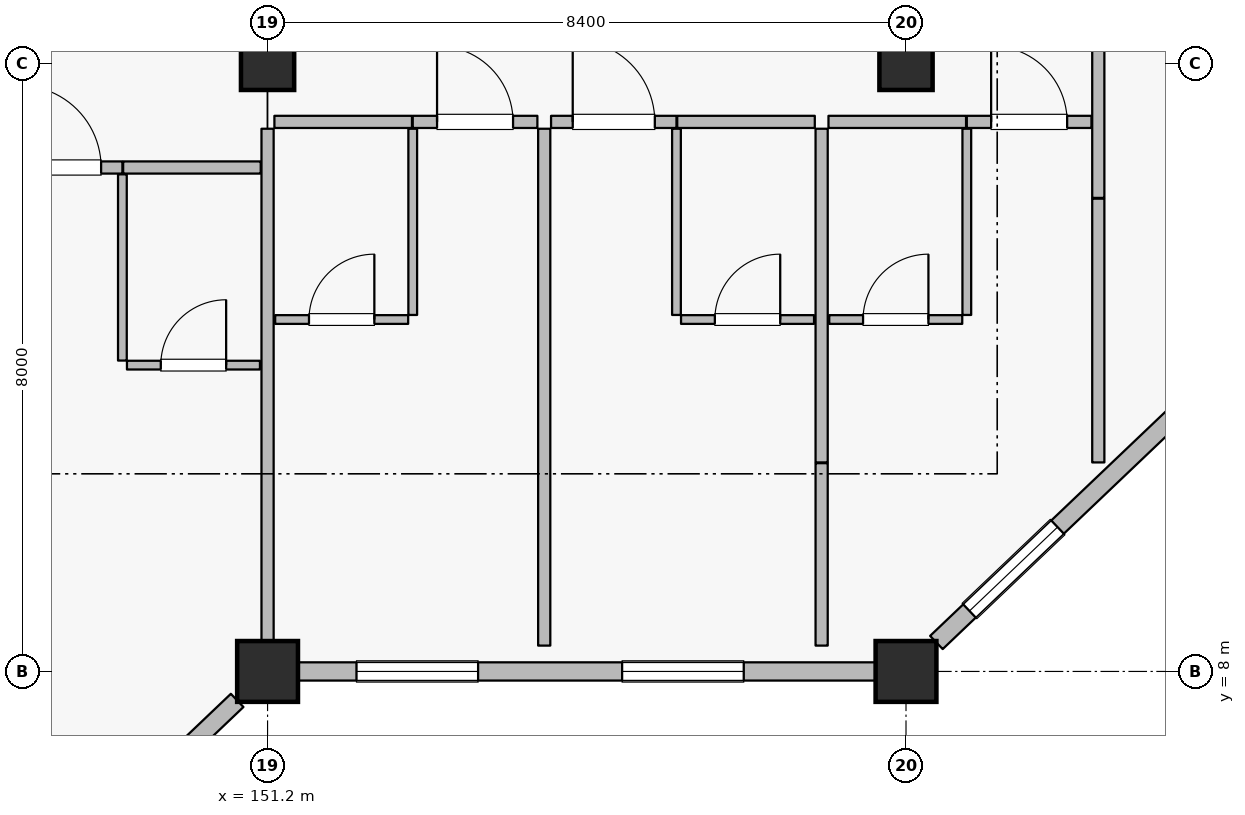
"""IFC4 building model, lengths in metres.
Left out: names, types, materials, properties, quantities, classifications, styles, units other than length and angle.
Written with IfcOpenShell. Run it as: python <this file> out.ifc"""

import sys

from ifc_helpers import new_model, si_unit, direction, frame, frame_2d, origin, origin_2d, place, context, subcontext, project, spatial, rectangle, extrude, element, fill, save


model = new_model("IFC4")
c1 = context("Model", 3, precision=1e-05, world=origin(), true_north=direction((0.0, 1.0)))
c2 = subcontext(c1, "Body", "Model", "MODEL_VIEW")
j1 = project(units=[si_unit("LENGTHUNIT", "METRE"), si_unit("PLANEANGLEUNIT", "RADIAN")], contexts=[c1])
p1 = place(None, origin())
s1 = spatial("IfcSite", under=j1, at=p1, CompositionType="ELEMENT")
p2 = place(p1, origin())
s2 = spatial("IfcBuilding", under=s1, at=p2, CompositionType="ELEMENT")
p3 = place(p2, frame((0.0, 0.0, 11.4)))
s3 = spatial("IfcBuildingStorey", under=s2, at=p3, CompositionType="ELEMENT", Elevation=11.4)
for number, where, z_axis, x_axis in (
    (1, (151.2, 8.0, 0.0), (0.0, 0.0, 1.0), (1.0, 0.0, 0.0)),
    (2, (159.6, 8.0, 0.0), (0.0, 0.0, 1.0), (1.0, 0.0, 0.0)),
):
    element("IfcColumn", number, at=place(p3, frame(where, z_axis=z_axis, x_axis=x_axis)), inside=s3, PredefinedType="COLUMN", context=c2, shape_type="SweptSolid", body=[
        extrude(rectangle(XDim=0.8, YDim=0.8, at=origin_2d()), origin(), (0.0, 0.0, 1.0), 4.8),
    ])
for number, where, z_axis, x_axis in (
    (3, (151.2, 16.0, 0.0), (0.0, 0.0, 1.0), (1.0, 0.0, 0.0)),
    (4, (159.6, 16.0, 0.0), (0.0, 0.0, 1.0), (1.0, 0.0, 0.0)),
):
    element("IfcColumn", number, at=place(p3, frame(where, z_axis=z_axis, x_axis=x_axis)), inside=s3, PredefinedType="COLUMN", context=c2, shape_type="SweptSolid", body=[
        extrude(rectangle(XDim=0.7, YDim=0.7, at=origin_2d()), origin(), (0.0, 0.0, 1.0), 4.8),
    ])
p4 = place(p3, frame((150.8, 7.619, 0.0), z_axis=(0.0, 0.0, 1.0), x_axis=(-0.724156739794, -0.689635422677, 0.0)))
e5 = element("IfcWall", 5, at=p4, inside=s3, PredefinedType="SOLIDWALL", context=c2, shape_type="SweptSolid", body=[
    extrude(rectangle(XDim=10.495, YDim=0.24, at=frame_2d((5.248, 0.0))), origin(), (0.0, 0.0, 1.0), 4.13),
])
p5 = place(p4, frame((1.368, 0.0, 0.8)))
e6 = element("IfcOpeningElement", 6, at=p5, cuts=e5, PredefinedType="OPENING", context=c2, shape_type="SweptSolid", body=[
    extrude(rectangle(XDim=1.6, YDim=1.6, at=frame_2d((0.8, 0.8))), frame((0.0, 0.13, 0.0), z_axis=(0.0, -1.0, 0.0), x_axis=(1.0, 0.0, 0.0)), (0.0, 0.0, 1.0), 0.26),
])
p6 = place(p4, frame((6.194, 0.0, 0.8)))
e7 = element("IfcOpeningElement", 7, at=p6, cuts=e5, PredefinedType="OPENING", context=c2, shape_type="SweptSolid", body=[
    extrude(rectangle(XDim=1.6, YDim=1.6, at=frame_2d((0.8, 0.8))), frame((0.0, 0.13, 0.0), z_axis=(0.0, -1.0, 0.0), x_axis=(1.0, 0.0, 0.0)), (0.0, 0.0, 1.0), 0.26),
])
p7 = place(p3, frame((159.2, 8.0, 0.0), z_axis=(0.0, 0.0, 1.0), x_axis=(-1.0, 0.0, 0.0)))
e8 = element("IfcWall", 8, at=p7, inside=s3, PredefinedType="SOLIDWALL", context=c2, shape_type="SweptSolid", body=[
    extrude(rectangle(XDim=7.6, YDim=0.24, at=frame_2d((3.8, 0.0))), origin(), (0.0, 0.0, 1.0), 4.13),
])
p8 = place(p7, frame((1.735, 0.0, 0.8)))
e9 = element("IfcOpeningElement", 9, at=p8, cuts=e8, PredefinedType="OPENING", context=c2, shape_type="SweptSolid", body=[
    extrude(rectangle(XDim=1.6, YDim=1.6, at=frame_2d((0.8, 0.8))), frame((0.0, 0.13, 0.0), z_axis=(0.0, -1.0, 0.0), x_axis=(1.0, 0.0, 0.0)), (0.0, 0.0, 1.0), 0.26),
])
p9 = place(p7, frame((5.23, 0.0, 0.8)))
e10 = element("IfcOpeningElement", 10, at=p9, cuts=e8, PredefinedType="OPENING", context=c2, shape_type="SweptSolid", body=[
    extrude(rectangle(XDim=1.6, YDim=1.6, at=frame_2d((0.8, 0.8))), frame((0.0, 0.13, 0.0), z_axis=(0.0, -1.0, 0.0), x_axis=(1.0, 0.0, 0.0)), (0.0, 0.0, 1.0), 0.26),
])
p10 = place(p3, frame((167.6, 15.619, 0.0), z_axis=(0.0, 0.0, 1.0), x_axis=(-0.724156739794, -0.689635422677, 0.0)))
e11 = element("IfcWall", 11, at=p10, inside=s3, PredefinedType="SOLIDWALL", context=c2, shape_type="SweptSolid", body=[
    extrude(rectangle(XDim=10.495, YDim=0.24, at=frame_2d((5.248, 0.0))), origin(), (0.0, 0.0, 1.0), 4.13),
])
p11 = place(p10, frame((0.388, 0.0, 0.8)))
e12 = element("IfcOpeningElement", 12, at=p11, cuts=e11, PredefinedType="OPENING", context=c2, shape_type="SweptSolid", body=[
    extrude(rectangle(XDim=1.6, YDim=1.6, at=frame_2d((0.8, 0.8))), frame((0.0, 0.13, 0.0), z_axis=(0.0, -1.0, 0.0), x_axis=(1.0, 0.0, 0.0)), (0.0, 0.0, 1.0), 0.26),
])
p12 = place(p10, frame((4.234, 0.0, 0.8)))
e13 = element("IfcOpeningElement", 13, at=p12, cuts=e11, PredefinedType="OPENING", context=c2, shape_type="SweptSolid", body=[
    extrude(rectangle(XDim=1.6, YDim=1.6, at=frame_2d((0.8, 0.8))), frame((0.0, 0.13, 0.0), z_axis=(0.0, -1.0, 0.0), x_axis=(1.0, 0.0, 0.0)), (0.0, 0.0, 1.0), 0.26),
])
p13 = place(p10, frame((8.294, 0.0, 0.8)))
e14 = element("IfcOpeningElement", 14, at=p13, cuts=e11, PredefinedType="OPENING", context=c2, shape_type="SweptSolid", body=[
    extrude(rectangle(XDim=1.6, YDim=1.6, at=frame_2d((0.8, 0.8))), frame((0.0, 0.13, 0.0), z_axis=(0.0, -1.0, 0.0), x_axis=(1.0, 0.0, 0.0)), (0.0, 0.0, 1.0), 0.26),
])
p14 = place(p3, frame((147.65, 14.63, 0.0), z_axis=(0.0, 0.0, 1.0), x_axis=(1.0, 0.0, 0.0)))
e15 = element("IfcWall", 15, at=p14, inside=s3, PredefinedType="PARTITIONING", context=c2, shape_type="SweptSolid", body=[
    extrude(rectangle(XDim=1.64, YDim=0.16, at=frame_2d((0.82, 0.0))), origin(), (0.0, 0.0, 1.0), 4.535),
])
p15 = place(p14, frame((0.28, 0.0, 0.0)))
e16 = element("IfcOpeningElement", 16, at=p15, cuts=e15, PredefinedType="OPENING", context=c2, shape_type="SweptSolid", body=[
    extrude(rectangle(XDim=1.08, YDim=2.3, at=frame_2d((0.54, 1.15))), frame((0.0, 0.09, 0.0), z_axis=(0.0, -1.0, 0.0), x_axis=(1.0, 0.0, 0.0)), (0.0, 0.0, 1.0), 0.18),
])
p16 = place(p3, frame((149.3, 14.63, 0.0), z_axis=(0.0, 0.0, 1.0), x_axis=(1.0, 0.0, 0.0)))
e17 = element("IfcWall", 17, at=p16, inside=s3, PredefinedType="PARTITIONING", context=c2, shape_type="SweptSolid", body=[
    extrude(rectangle(XDim=1.81, YDim=0.16, at=frame_2d((0.905, 0.0))), origin(), (0.0, 0.0, 1.0), 4.535),
])
p17 = place(p3, frame((149.29, 12.09, 0.0), z_axis=(0.0, 0.0, 1.0), x_axis=(0.0, 1.0, 0.0)))
e18 = element("IfcWall", 18, at=p17, inside=s3, PredefinedType="PARTITIONING", context=c2, shape_type="SweptSolid", body=[
    extrude(rectangle(XDim=2.45, YDim=0.115, at=frame_2d((1.225, 0.0))), origin(), (0.0, 0.0, 1.0), 4.535),
])
p18 = place(p3, frame((149.35, 12.03, 0.0), z_axis=(0.0, 0.0, 1.0), x_axis=(1.0, 0.0, 0.0)))
e19 = element("IfcWall", 19, at=p18, inside=s3, PredefinedType="PARTITIONING", context=c2, shape_type="SweptSolid", body=[
    extrude(rectangle(XDim=1.75, YDim=0.115, at=frame_2d((0.875, 0.0))), origin(), (0.0, 0.0, 1.0), 4.535),
])
p19 = place(p18, frame((0.445, 0.0, 0.0)))
e20 = element("IfcOpeningElement", 20, at=p19, cuts=e19, PredefinedType="OPENING", context=c2, shape_type="SweptSolid", body=[
    extrude(rectangle(XDim=0.86, YDim=2.12, at=frame_2d((0.43, 1.06))), frame((0.0, 0.067, 0.0), z_axis=(0.0, -1.0, 0.0), x_axis=(1.0, 0.0, 0.0)), (0.0, 0.0, 1.0), 0.135),
])
p20 = place(p3, frame((151.29, 15.23, 0.0), z_axis=(0.0, 0.0, 1.0), x_axis=(1.0, 0.0, 0.0)))
e21 = element("IfcWall", 21, at=p20, inside=s3, PredefinedType="PARTITIONING", context=c2, shape_type="SweptSolid", body=[
    extrude(rectangle(XDim=1.81, YDim=0.16, at=frame_2d((0.905, 0.0))), origin(), (0.0, 0.0, 1.0), 4.535),
])
p21 = place(p3, frame((153.11, 15.23, 0.0), z_axis=(0.0, 0.0, 1.0), x_axis=(1.0, 0.0, 0.0)))
e22 = element("IfcWall", 22, at=p21, inside=s3, PredefinedType="PARTITIONING", context=c2, shape_type="SweptSolid", body=[
    extrude(rectangle(XDim=1.64, YDim=0.16, at=frame_2d((0.82, 0.0))), origin(), (0.0, 0.0, 1.0), 4.535),
])
p22 = place(p21, frame((0.32, 0.0, 0.0)))
e23 = element("IfcOpeningElement", 23, at=p22, cuts=e22, PredefinedType="OPENING", context=c2, shape_type="SweptSolid", body=[
    extrude(rectangle(XDim=1.0, YDim=2.25, at=frame_2d((0.5, 1.125))), frame((0.0, 0.09, 0.0), z_axis=(0.0, -1.0, 0.0), x_axis=(1.0, 0.0, 0.0)), (0.0, 0.0, 1.0), 0.18),
])
p23 = place(p3, frame((153.11, 12.69, 0.0), z_axis=(0.0, 0.0, 1.0), x_axis=(0.0, 1.0, 0.0)))
e24 = element("IfcWall", 24, at=p23, inside=s3, PredefinedType="PARTITIONING", context=c2, shape_type="SweptSolid", body=[
    extrude(rectangle(XDim=2.45, YDim=0.115, at=frame_2d((1.225, 0.0))), origin(), (0.0, 0.0, 1.0), 4.535),
])
p24 = place(p3, frame((151.3, 12.63, 0.0), z_axis=(0.0, 0.0, 1.0), x_axis=(1.0, 0.0, 0.0)))
e25 = element("IfcWall", 25, at=p24, inside=s3, PredefinedType="PARTITIONING", context=c2, shape_type="SweptSolid", body=[
    extrude(rectangle(XDim=1.75, YDim=0.115, at=frame_2d((0.875, 0.0))), origin(), (0.0, 0.0, 1.0), 4.535),
])
p25 = place(p24, frame((0.445, 0.0, 0.0)))
e26 = element("IfcOpeningElement", 26, at=p25, cuts=e25, PredefinedType="OPENING", context=c2, shape_type="SweptSolid", body=[
    extrude(rectangle(XDim=0.86, YDim=2.12, at=frame_2d((0.43, 1.06))), frame((0.0, 0.067, 0.0), z_axis=(0.0, -1.0, 0.0), x_axis=(1.0, 0.0, 0.0)), (0.0, 0.0, 1.0), 0.135),
])
p26 = place(p3, frame((151.2, 8.34, 0.0), z_axis=(0.0, 0.0, 1.0), x_axis=(0.0, 1.0, 0.0)))
e27 = element("IfcWall", 27, at=p26, inside=s3, PredefinedType="PARTITIONING", context=c2, shape_type="SweptSolid", body=[
    extrude(rectangle(XDim=6.8, YDim=0.16, at=frame_2d((3.4, 0.0))), origin(), (0.0, 0.0, 1.0), 3.98),
])
p27 = place(p3, frame((154.93, 15.23, 0.0), z_axis=(0.0, 0.0, 1.0), x_axis=(1.0, 0.0, 0.0)))
e28 = element("IfcWall", 28, at=p27, inside=s3, PredefinedType="PARTITIONING", context=c2, shape_type="SweptSolid", body=[
    extrude(rectangle(XDim=1.65, YDim=0.16, at=frame_2d((0.825, 0.0))), origin(), (0.0, 0.0, 1.0), 4.535),
])
p28 = place(p27, frame((0.285, 0.0, 0.0)))
e29 = element("IfcOpeningElement", 29, at=p28, cuts=e28, PredefinedType="OPENING", context=c2, shape_type="SweptSolid", body=[
    extrude(rectangle(XDim=1.08, YDim=2.3, at=frame_2d((0.54, 1.15))), frame((0.0, 0.09, 0.0), z_axis=(0.0, -1.0, 0.0), x_axis=(1.0, 0.0, 0.0)), (0.0, 0.0, 1.0), 0.18),
])
p29 = place(p3, frame((156.59, 15.23, 0.0), z_axis=(0.0, 0.0, 1.0), x_axis=(1.0, 0.0, 0.0)))
e30 = element("IfcWall", 30, at=p29, inside=s3, PredefinedType="PARTITIONING", context=c2, shape_type="SweptSolid", body=[
    extrude(rectangle(XDim=1.81, YDim=0.16, at=frame_2d((0.905, 0.0))), origin(), (0.0, 0.0, 1.0), 4.535),
])
p30 = place(p3, frame((156.58, 12.69, 0.0), z_axis=(0.0, 0.0, 1.0), x_axis=(0.0, 1.0, 0.0)))
e31 = element("IfcWall", 31, at=p30, inside=s3, PredefinedType="PARTITIONING", context=c2, shape_type="SweptSolid", body=[
    extrude(rectangle(XDim=2.45, YDim=0.115, at=frame_2d((1.225, 0.0))), origin(), (0.0, 0.0, 1.0), 4.535),
])
p31 = place(p3, frame((156.64, 12.63, 0.0), z_axis=(0.0, 0.0, 1.0), x_axis=(1.0, 0.0, 0.0)))
e32 = element("IfcWall", 32, at=p31, inside=s3, PredefinedType="PARTITIONING", context=c2, shape_type="SweptSolid", body=[
    extrude(rectangle(XDim=1.75, YDim=0.115, at=frame_2d((0.875, 0.0))), origin(), (0.0, 0.0, 1.0), 4.535),
])
p32 = place(p31, frame((0.445, 0.0, 0.0)))
e33 = element("IfcOpeningElement", 33, at=p32, cuts=e32, PredefinedType="OPENING", context=c2, shape_type="SweptSolid", body=[
    extrude(rectangle(XDim=0.86, YDim=2.12, at=frame_2d((0.43, 1.06))), frame((0.0, 0.067, 0.0), z_axis=(0.0, -1.0, 0.0), x_axis=(1.0, 0.0, 0.0)), (0.0, 0.0, 1.0), 0.135),
])
p33 = place(p3, frame((154.84, 8.34, 0.0), z_axis=(0.0, 0.0, 1.0), x_axis=(0.0, 1.0, 0.0)))
e34 = element("IfcWall", 34, at=p33, inside=s3, PredefinedType="PARTITIONING", context=c2, shape_type="SweptSolid", body=[
    extrude(rectangle(XDim=6.8, YDim=0.16, at=frame_2d((3.4, 0.0))), origin(), (0.0, 0.0, 1.0), 4.535),
])
p34 = place(p3, frame((158.49, 8.34, 0.0), z_axis=(0.0, 0.0, 1.0), x_axis=(0.0, 1.0, 0.0)))
e35 = element("IfcWall", 35, at=p34, inside=s3, PredefinedType="PARTITIONING", context=c2, shape_type="SweptSolid", body=[
    extrude(rectangle(XDim=2.4, YDim=0.16, at=frame_2d((1.2, 0.0))), origin(), (0.0, 0.0, 1.0), 4.535),
])
p35 = place(p3, frame((158.58, 15.23, 0.0), z_axis=(0.0, 0.0, 1.0), x_axis=(1.0, 0.0, 0.0)))
e36 = element("IfcWall", 36, at=p35, inside=s3, PredefinedType="PARTITIONING", context=c2, shape_type="SweptSolid", body=[
    extrude(rectangle(XDim=1.81, YDim=0.16, at=frame_2d((0.905, 0.0))), origin(), (0.0, 0.0, 1.0), 4.535),
])
p36 = place(p3, frame((160.4, 15.23, 0.0), z_axis=(0.0, 0.0, 1.0), x_axis=(1.0, 0.0, 0.0)))
e37 = element("IfcWall", 37, at=p36, inside=s3, PredefinedType="PARTITIONING", context=c2, shape_type="SweptSolid", body=[
    extrude(rectangle(XDim=1.64, YDim=0.16, at=frame_2d((0.82, 0.0))), origin(), (0.0, 0.0, 1.0), 4.535),
])
p37 = place(p36, frame((0.32, 0.0, 0.0)))
e38 = element("IfcOpeningElement", 38, at=p37, cuts=e37, PredefinedType="OPENING", context=c2, shape_type="SweptSolid", body=[
    extrude(rectangle(XDim=1.0, YDim=2.25, at=frame_2d((0.5, 1.125))), frame((0.0, 0.09, 0.0), z_axis=(0.0, -1.0, 0.0), x_axis=(1.0, 0.0, 0.0)), (0.0, 0.0, 1.0), 0.18),
])
p38 = place(p3, frame((160.4, 12.69, 0.0), z_axis=(0.0, 0.0, 1.0), x_axis=(0.0, 1.0, 0.0)))
e39 = element("IfcWall", 39, at=p38, inside=s3, PredefinedType="PARTITIONING", context=c2, shape_type="SweptSolid", body=[
    extrude(rectangle(XDim=2.45, YDim=0.115, at=frame_2d((1.225, 0.0))), origin(), (0.0, 0.0, 1.0), 4.535),
])
p39 = place(p3, frame((158.59, 12.63, 0.0), z_axis=(0.0, 0.0, 1.0), x_axis=(1.0, 0.0, 0.0)))
e40 = element("IfcWall", 40, at=p39, inside=s3, PredefinedType="PARTITIONING", context=c2, shape_type="SweptSolid", body=[
    extrude(rectangle(XDim=1.75, YDim=0.115, at=frame_2d((0.875, 0.0))), origin(), (0.0, 0.0, 1.0), 4.535),
])
p40 = place(p39, frame((0.445, 0.0, 0.0)))
e41 = element("IfcOpeningElement", 41, at=p40, cuts=e40, PredefinedType="OPENING", context=c2, shape_type="SweptSolid", body=[
    extrude(rectangle(XDim=0.86, YDim=2.12, at=frame_2d((0.43, 1.06))), frame((0.0, 0.067, 0.0), z_axis=(0.0, -1.0, 0.0), x_axis=(1.0, 0.0, 0.0)), (0.0, 0.0, 1.0), 0.135),
])
p41 = place(p3, frame((158.49, 10.75, 0.0), z_axis=(0.0, 0.0, 1.0), x_axis=(0.0, 1.0, 0.0)))
e42 = element("IfcWall", 42, at=p41, inside=s3, PredefinedType="PARTITIONING", context=c2, shape_type="SweptSolid", body=[
    extrude(rectangle(XDim=4.39, YDim=0.16, at=frame_2d((2.195, 0.0))), origin(), (0.0, 0.0, 1.0), 4.535),
])
p42 = place(p3, frame((162.13, 10.75, 0.0), z_axis=(0.0, 0.0, 1.0), x_axis=(0.0, 1.0, 0.0)))
e43 = element("IfcWall", 43, at=p42, inside=s3, PredefinedType="PARTITIONING", context=c2, shape_type="SweptSolid", body=[
    extrude(rectangle(XDim=3.47, YDim=0.16, at=frame_2d((1.735, 0.0))), origin(), (0.0, 0.0, 1.0), 4.535),
])
p43 = place(p3, frame((162.13, 14.23, 0.0), z_axis=(0.0, 0.0, 1.0), x_axis=(0.0, 1.0, 0.0)))
e44 = element("IfcWall", 44, at=p43, inside=s3, PredefinedType="PARTITIONING", context=c2, shape_type="SweptSolid", body=[
    extrude(rectangle(XDim=8.91, YDim=0.16, at=frame_2d((4.455, 0.0))), origin(), (0.0, 0.0, 1.0), 4.535),
])
p44 = place(p8, origin())
e45 = element("IfcWindow", 45, at=p44, inside=s3, PartitioningType="SINGLE_PANEL", PredefinedType="WINDOW", context=c2, shape_type="SweptSolid", body=[
    extrude(rectangle(XDim=1.6, YDim=1.6, at=frame_2d((0.8, 0.8))), frame((0.0, 0.03, 0.0), z_axis=(0.0, -1.0, 0.0), x_axis=(1.0, 0.0, 0.0)), (0.0, 0.0, 1.0), 0.06),
])
fill(e9, e45)
p45 = place(p9, origin())
e46 = element("IfcWindow", 46, at=p45, inside=s3, PartitioningType="SINGLE_PANEL", PredefinedType="WINDOW", context=c2, shape_type="SweptSolid", body=[
    extrude(rectangle(XDim=1.6, YDim=1.6, at=frame_2d((0.8, 0.8))), frame((0.0, 0.03, 0.0), z_axis=(0.0, -1.0, 0.0), x_axis=(1.0, 0.0, 0.0)), (0.0, 0.0, 1.0), 0.06),
])
fill(e10, e46)
p46 = place(p13, origin())
e47 = element("IfcWindow", 47, at=p46, inside=s3, PartitioningType="SINGLE_PANEL", PredefinedType="WINDOW", context=c2, shape_type="SweptSolid", body=[
    extrude(rectangle(XDim=1.6, YDim=1.6, at=frame_2d((0.8, 0.8))), frame((0.0, 0.03, 0.0), z_axis=(0.0, -1.0, 0.0), x_axis=(1.0, 0.0, 0.0)), (0.0, 0.0, 1.0), 0.06),
])
fill(e14, e47)
p47 = place(p15, origin())
e48 = element("IfcDoor", 48, at=p47, inside=s3, OperationType="SINGLE_SWING_LEFT", PredefinedType="DOOR", context=c2, shape_type="SweptSolid", body=[
    extrude(rectangle(XDim=1.08, YDim=2.3, at=frame_2d((0.54, 1.15))), frame((0.0, 0.025, 0.0), z_axis=(0.0, -1.0, 0.0), x_axis=(1.0, 0.0, 0.0)), (0.0, 0.0, 1.0), 0.05),
])
fill(e16, e48)
p48 = place(p19, origin())
e49 = element("IfcDoor", 49, at=p48, inside=s3, OperationType="SINGLE_SWING_RIGHT", PredefinedType="DOOR", context=c2, shape_type="SweptSolid", body=[
    extrude(rectangle(XDim=0.86, YDim=2.12, at=frame_2d((0.43, 1.06))), frame((0.0, 0.025, 0.0), z_axis=(0.0, -1.0, 0.0), x_axis=(1.0, 0.0, 0.0)), (0.0, 0.0, 1.0), 0.05),
])
fill(e20, e49)
p49 = place(p22, origin())
e50 = element("IfcDoor", 50, at=p49, inside=s3, OperationType="SINGLE_SWING_LEFT", PredefinedType="DOOR", context=c2, shape_type="SweptSolid", body=[
    extrude(rectangle(XDim=1.0, YDim=2.25, at=frame_2d((0.5, 1.125))), frame((0.0, 0.025, 0.0), z_axis=(0.0, -1.0, 0.0), x_axis=(1.0, 0.0, 0.0)), (0.0, 0.0, 1.0), 0.05),
])
fill(e23, e50)
p50 = place(p25, origin())
e51 = element("IfcDoor", 51, at=p50, inside=s3, OperationType="SINGLE_SWING_RIGHT", PredefinedType="DOOR", context=c2, shape_type="SweptSolid", body=[
    extrude(rectangle(XDim=0.86, YDim=2.12, at=frame_2d((0.43, 1.06))), frame((0.0, 0.025, 0.0), z_axis=(0.0, -1.0, 0.0), x_axis=(1.0, 0.0, 0.0)), (0.0, 0.0, 1.0), 0.05),
])
fill(e26, e51)
p51 = place(p28, origin())
e52 = element("IfcDoor", 52, at=p51, inside=s3, OperationType="SINGLE_SWING_LEFT", PredefinedType="DOOR", context=c2, shape_type="SweptSolid", body=[
    extrude(rectangle(XDim=1.08, YDim=2.3, at=frame_2d((0.54, 1.15))), frame((0.0, 0.025, 0.0), z_axis=(0.0, -1.0, 0.0), x_axis=(1.0, 0.0, 0.0)), (0.0, 0.0, 1.0), 0.05),
])
fill(e29, e52)
p52 = place(p32, origin())
e53 = element("IfcDoor", 53, at=p52, inside=s3, OperationType="SINGLE_SWING_RIGHT", PredefinedType="DOOR", context=c2, shape_type="SweptSolid", body=[
    extrude(rectangle(XDim=0.86, YDim=2.12, at=frame_2d((0.43, 1.06))), frame((0.0, 0.025, 0.0), z_axis=(0.0, -1.0, 0.0), x_axis=(1.0, 0.0, 0.0)), (0.0, 0.0, 1.0), 0.05),
])
fill(e33, e53)
p53 = place(p37, origin())
e54 = element("IfcDoor", 54, at=p53, inside=s3, OperationType="SINGLE_SWING_LEFT", PredefinedType="DOOR", context=c2, shape_type="SweptSolid", body=[
    extrude(rectangle(XDim=1.0, YDim=2.25, at=frame_2d((0.5, 1.125))), frame((0.0, 0.025, 0.0), z_axis=(0.0, -1.0, 0.0), x_axis=(1.0, 0.0, 0.0)), (0.0, 0.0, 1.0), 0.05),
])
fill(e38, e54)
p54 = place(p40, origin())
e55 = element("IfcDoor", 55, at=p54, inside=s3, OperationType="SINGLE_SWING_RIGHT", PredefinedType="DOOR", context=c2, shape_type="SweptSolid", body=[
    extrude(rectangle(XDim=0.86, YDim=2.12, at=frame_2d((0.43, 1.06))), frame((0.0, 0.025, 0.0), z_axis=(0.0, -1.0, 0.0), x_axis=(1.0, 0.0, 0.0)), (0.0, 0.0, 1.0), 0.05),
])
fill(e41, e55)
save(model, sys.argv[1])
